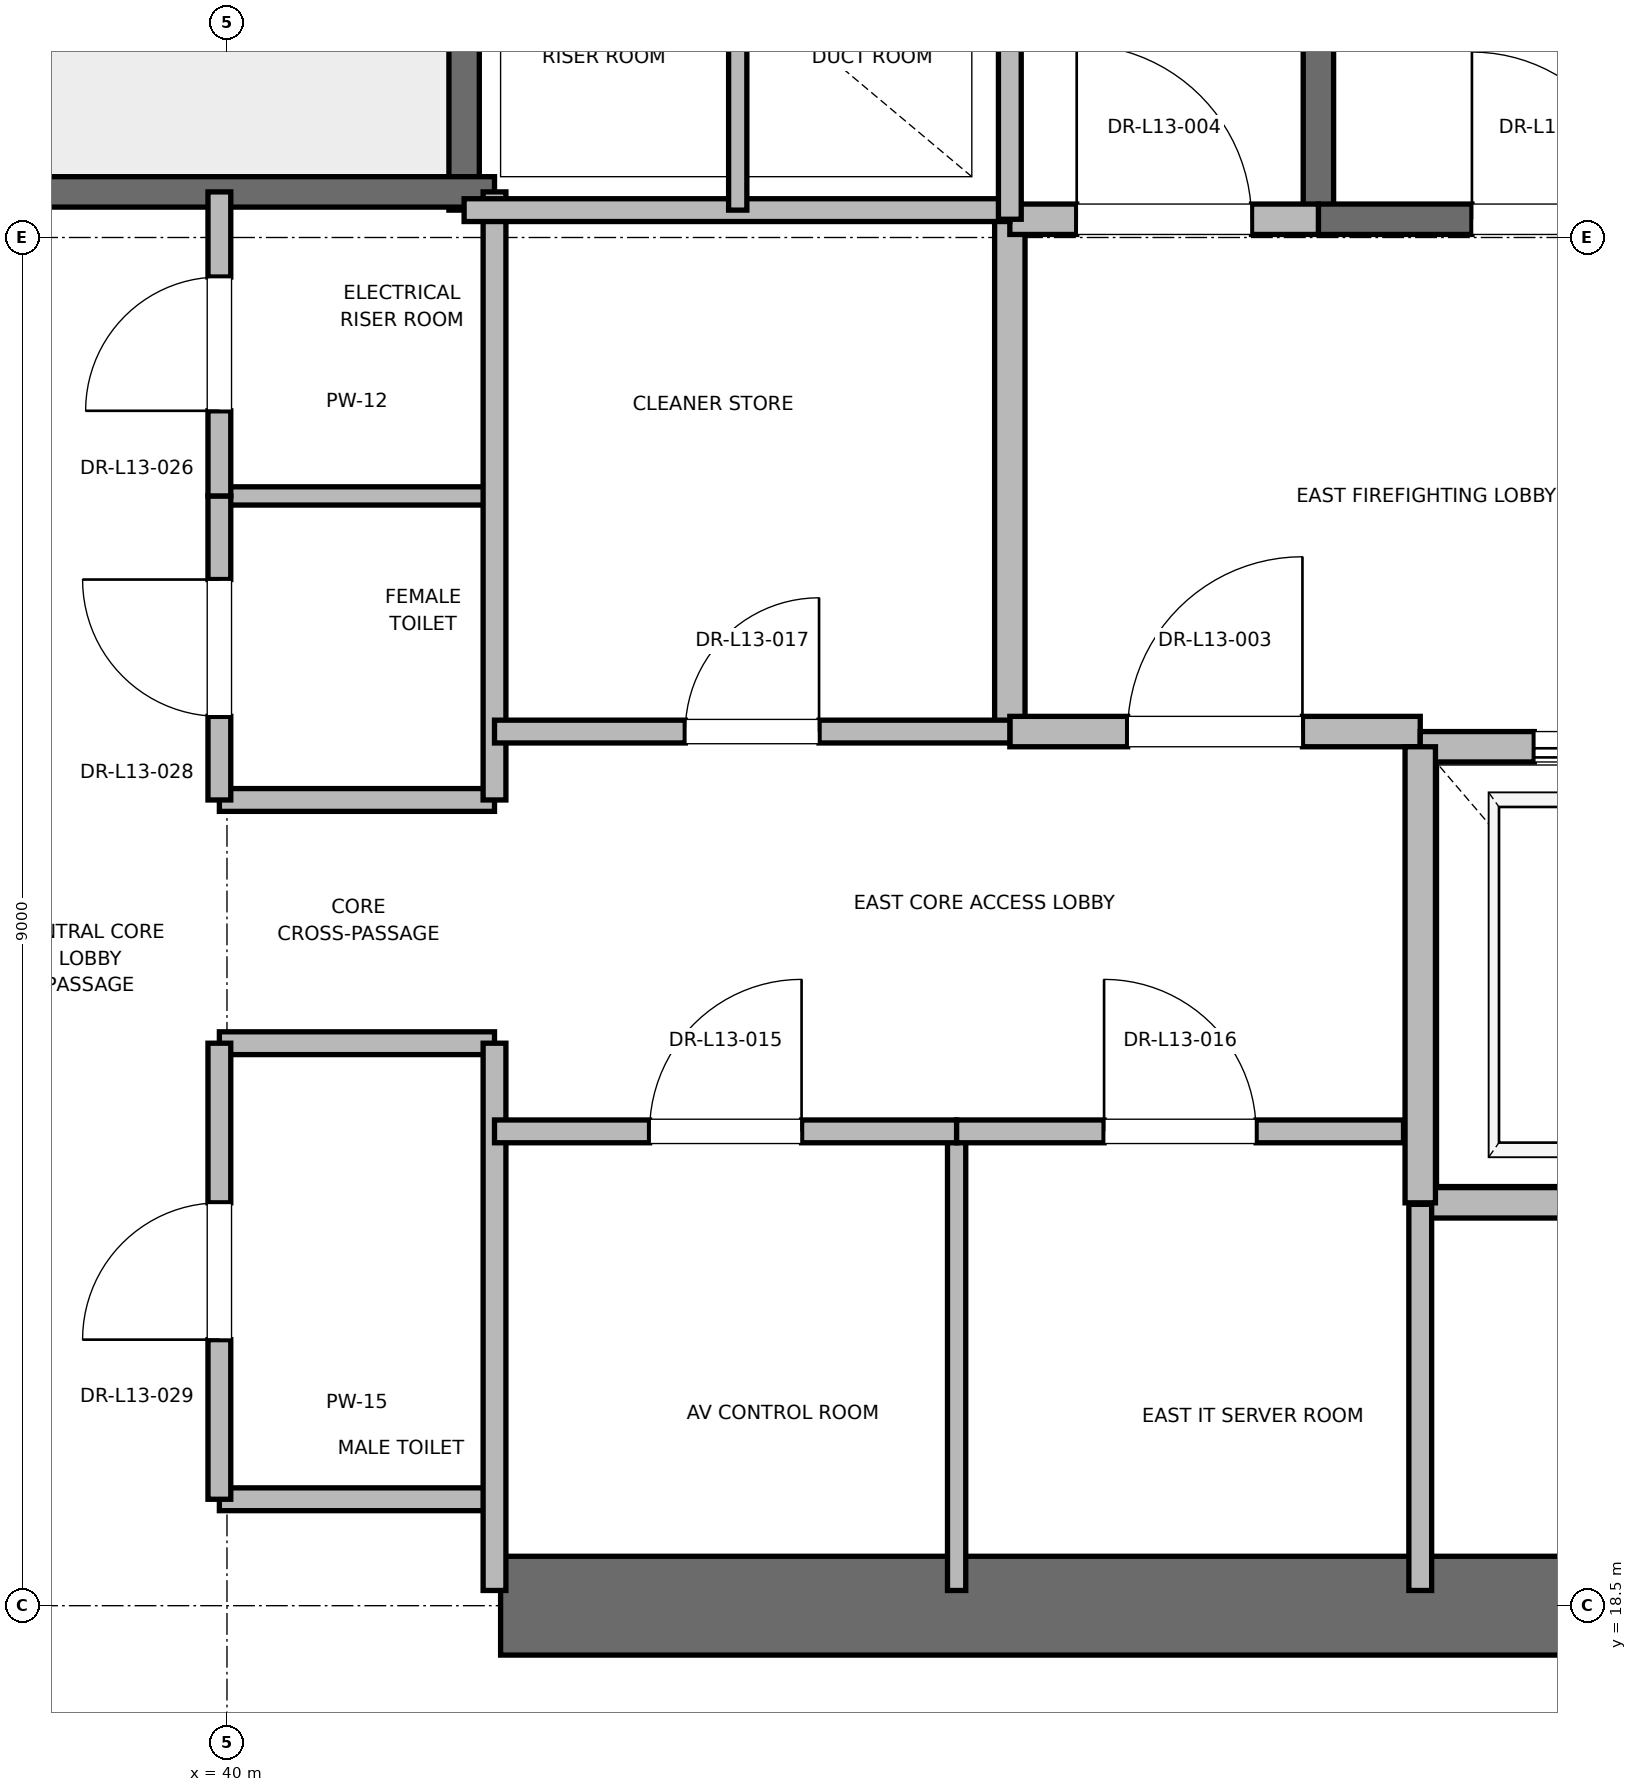
"""IFC4 building model, lengths in metres.
Left out: names, types, materials, properties, quantities, classifications, styles, units other than length and angle.
Written with IfcOpenShell. Run it as: python <this file> out.ifc"""

import sys

from ifc_helpers import new_model, si_unit, direction, frame, frame_2d, origin, place, context, subcontext, project, spatial, rectangle, extrude, element, fill, save


model = new_model("IFC4")
c1 = context("Model", 3, precision=1e-05, world=origin(), true_north=direction((0.0, 1.0)))
c2 = subcontext(c1, "Body", "Model", "MODEL_VIEW")
j1 = project(units=[si_unit("LENGTHUNIT", "METRE"), si_unit("PLANEANGLEUNIT", "RADIAN")], contexts=[c1])
p1 = place(None, origin())
s1 = spatial("IfcSite", under=j1, at=p1, CompositionType="ELEMENT")
p2 = place(p1, origin())
s2 = spatial("IfcBuilding", under=s1, at=p2, CompositionType="ELEMENT")
p3 = place(p2, frame((0.0, 0.0, 59.6)))
s3 = spatial("IfcBuildingStorey", under=s2, at=p3, CompositionType="ELEMENT", Elevation=59.6)
p4 = place(p3, frame((41.8, 18.5, 0.0), z_axis=(0.0, 0.0, 1.0), x_axis=(1.0, 0.0, 0.0)))
e1 = element("IfcWall", 1, at=p4, inside=s3, PredefinedType="SHEAR", context=c2, shape_type="SweptSolid", body=[
    extrude(rectangle(XDim=9.2, YDim=0.65, at=frame_2d((4.6, 0.0))), origin(), (0.0, 0.0, 1.0), 3.76),
])
p5 = place(p3, frame((47.18, 27.62, 0.0), z_axis=(0.0, 0.0, 1.0), x_axis=(0.0, 1.0, 0.0)))
e2 = element("IfcWall", 2, at=p5, inside=s3, PredefinedType="SOLIDWALL", context=c2, shape_type="SweptSolid", body=[
    extrude(rectangle(XDim=8.18, YDim=0.2, at=frame_2d((4.09, 0.0))), origin(), (0.0, 0.0, 1.0), 3.76),
])
p6 = place(p3, frame((47.18, 27.62, 0.0), z_axis=(0.0, 0.0, 1.0), x_axis=(1.0, 0.0, 0.0)))
e3 = element("IfcWall", 3, at=p6, inside=s3, PredefinedType="SOLIDWALL", context=c2, shape_type="SweptSolid", body=[
    extrude(rectangle(XDim=3.12, YDim=0.2, at=frame_2d((1.56, 0.0))), origin(), (0.0, 0.0, 1.0), 3.76),
])
p7 = place(p6, frame((1.01, 0.0, 0.0)))
e4 = element("IfcOpeningElement", 4, at=p7, cuts=e3, PredefinedType="OPENING", context=c2, shape_type="SweptSolid", body=[
    extrude(rectangle(XDim=1.1, YDim=2.15, at=frame_2d((0.55, 1.075))), frame((0.0, 0.1, 0.0), z_axis=(0.0, -1.0, 0.0), x_axis=(1.0, 0.0, 0.0)), (0.0, 0.0, 1.0), 0.2),
])
p8 = place(p3, frame((41.56, 27.68, 0.0), z_axis=(0.0, 0.0, 1.0), x_axis=(0.0, 1.0, 0.0)))
e5 = element("IfcWall", 5, at=p8, inside=s3, PredefinedType="SOLIDWALL", context=c2, shape_type="SweptSolid", body=[
    extrude(rectangle(XDim=8.57, YDim=0.2, at=frame_2d((4.285, 0.0))), origin(), (0.0, 0.0, 1.0), 3.76),
])
p9 = place(p3, frame((38.44, 27.8, 0.0), z_axis=(0.0, 0.0, 1.0), x_axis=(1.0, 0.0, 0.0)))
e6 = element("IfcWall", 6, at=p9, inside=s3, PredefinedType="SOLIDWALL", context=c2, shape_type="SweptSolid", body=[
    extrude(rectangle(XDim=3.32, YDim=0.2, at=frame_2d((1.66, 0.0))), origin(), (0.0, 0.0, 1.0), 3.76),
])
p10 = place(p3, frame((45.15, 24.25, 0.0), z_axis=(0.0, 0.0, 1.0), x_axis=(0.0, 1.0, 0.0)))
e7 = element("IfcWall", 7, at=p10, inside=s3, PredefinedType="PARTITIONING", context=c2, shape_type="SweptSolid", body=[
    extrude(rectangle(XDim=3.37, YDim=0.2, at=frame_2d((1.685, 0.0))), origin(), (0.0, 0.0, 1.0), 3.76),
])
p11 = place(p3, frame((45.15, 24.25, 0.0), z_axis=(0.0, 0.0, 1.0), x_axis=(1.0, 0.0, 0.0)))
e8 = element("IfcWall", 8, at=p11, inside=s3, PredefinedType="PARTITIONING", context=c2, shape_type="SweptSolid", body=[
    extrude(rectangle(XDim=2.7, YDim=0.2, at=frame_2d((1.35, 0.0))), origin(), (0.0, 0.0, 1.0), 3.76),
])
p12 = place(p11, frame((0.775, 0.0, 0.0)))
e9 = element("IfcOpeningElement", 9, at=p12, cuts=e8, PredefinedType="OPENING", context=c2, shape_type="SweptSolid", body=[
    extrude(rectangle(XDim=1.15, YDim=2.2, at=frame_2d((0.575, 1.1))), frame((0.0, 0.1, 0.0), z_axis=(0.0, -1.0, 0.0), x_axis=(1.0, 0.0, 0.0)), (0.0, 0.0, 1.0), 0.2),
])
p13 = place(p3, frame((45.15, 27.62, 0.0), z_axis=(0.0, 0.0, 1.0), x_axis=(1.0, 0.0, 0.0)))
e10 = element("IfcWall", 10, at=p13, inside=s3, PredefinedType="PARTITIONING", context=c2, shape_type="SweptSolid", body=[
    extrude(rectangle(XDim=2.03, YDim=0.2, at=frame_2d((1.015, 0.0))), origin(), (0.0, 0.0, 1.0), 3.76),
])
p14 = place(p13, frame((0.44, 0.0, 0.0)))
e11 = element("IfcOpeningElement", 11, at=p14, cuts=e10, PredefinedType="OPENING", context=c2, shape_type="SweptSolid", body=[
    extrude(rectangle(XDim=1.15, YDim=2.2, at=frame_2d((0.575, 1.1))), frame((0.0, 0.1, 0.0), z_axis=(0.0, -1.0, 0.0), x_axis=(1.0, 0.0, 0.0)), (0.0, 0.0, 1.0), 0.2),
])
p15 = place(p3, frame((47.85, 21.15, 0.0), z_axis=(0.0, 0.0, 1.0), x_axis=(1.0, 0.0, 0.0)))
e12 = element("IfcWall", 12, at=p15, inside=s3, PredefinedType="SOLIDWALL", context=c2, shape_type="SweptSolid", body=[
    extrude(rectangle(XDim=2.6, YDim=0.2, at=frame_2d((1.3, 0.0))), origin(), (0.0, 0.0, 1.0), 3.76),
])
p16 = place(p3, frame((50.45, 24.15, 0.0), z_axis=(0.0, 0.0, 1.0), x_axis=(-1.0, 0.0, 0.0)))
e13 = element("IfcWall", 13, at=p16, inside=s3, PredefinedType="SOLIDWALL", context=c2, shape_type="SweptSolid", body=[
    extrude(rectangle(XDim=2.6, YDim=0.2, at=frame_2d((1.3, 0.0))), origin(), (0.0, 0.0, 1.0), 2.54),
])
p17 = place(p16, frame((0.75, 0.0, 0.0)))
e14 = element("IfcOpeningElement", 14, at=p17, cuts=e13, PredefinedType="OPENING", context=c2, shape_type="SweptSolid", body=[
    extrude(rectangle(XDim=1.1, YDim=2.2, at=frame_2d((0.55, 1.1))), frame((0.0, 0.1, 0.0), z_axis=(0.0, -1.0, 0.0), x_axis=(1.0, 0.0, 0.0)), (0.0, 0.0, 1.0), 0.2),
])
p18 = place(p3, frame((47.85, 24.15, 0.0), z_axis=(0.0, 0.0, 1.0), x_axis=(0.0, -1.0, 0.0)))
e15 = element("IfcWall", 15, at=p18, inside=s3, PredefinedType="SOLIDWALL", context=c2, shape_type="SweptSolid", body=[
    extrude(rectangle(XDim=3.0, YDim=0.2, at=frame_2d((1.5, 0.0))), origin(), (0.0, 0.0, 1.0), 3.76),
])
for number, where, z_axis, x_axis in (
    (16, (39.95, 19.2, 0.0), (0.0, 0.0, 1.0), (1.0, 0.0, 0.0)),
    (17, (39.95, 22.2, 0.0), (0.0, 0.0, 1.0), (1.0, 0.0, 0.0)),
    (18, (39.95, 23.8, 0.0), (0.0, 0.0, 1.0), (1.0, 0.0, 0.0)),
):
    element("IfcWall", number, at=place(p3, frame(where, z_axis=z_axis, x_axis=x_axis)), inside=s3, PredefinedType="PARTITIONING", context=c2, shape_type="SweptSolid", body=[
        extrude(rectangle(XDim=1.81, YDim=0.15, at=frame_2d((0.905, 0.0))), origin(), (0.0, 0.0, 1.0), 2.85),
    ])
p19 = place(p3, frame((39.95, 25.8, 0.0), z_axis=(0.0, 0.0, 1.0), x_axis=(1.0, 0.0, 0.0)))
e19 = element("IfcWall", 19, at=p19, inside=s3, PredefinedType="PARTITIONING", context=c2, shape_type="SweptSolid", body=[
    extrude(rectangle(XDim=1.81, YDim=0.12, at=frame_2d((0.905, 0.0))), origin(), (0.0, 0.0, 1.0), 2.85),
])
p20 = place(p3, frame((41.76, 18.6, 0.0), z_axis=(0.0, 0.0, 1.0), x_axis=(0.0, 1.0, 0.0)))
e20 = element("IfcWall", 20, at=p20, inside=s3, PredefinedType="PARTITIONING", context=c2, shape_type="SweptSolid", body=[
    extrude(rectangle(XDim=3.6, YDim=0.15, at=frame_2d((1.8, 0.0))), origin(), (0.0, 0.0, 1.0), 2.54),
])
p21 = place(p3, frame((41.76, 23.8, 0.0), z_axis=(0.0, 0.0, 1.0), x_axis=(0.0, 1.0, 0.0)))
e21 = element("IfcWall", 21, at=p21, inside=s3, PredefinedType="PARTITIONING", context=c2, shape_type="SweptSolid", body=[
    extrude(rectangle(XDim=4.0, YDim=0.15, at=frame_2d((2.0, 0.0))), origin(), (0.0, 0.0, 1.0), 2.85),
])
p22 = place(p3, frame((39.95, 19.2, 0.0), z_axis=(0.0, 0.0, 1.0), x_axis=(0.0, 1.0, 0.0)))
e22 = element("IfcWall", 22, at=p22, inside=s3, PredefinedType="PARTITIONING", context=c2, shape_type="SweptSolid", body=[
    extrude(rectangle(XDim=3.0, YDim=0.15, at=frame_2d((1.5, 0.0))), origin(), (0.0, 0.0, 1.0), 2.85),
])
p23 = place(p22, frame((1.05, 0.0, 0.0)))
e23 = element("IfcOpeningElement", 23, at=p23, cuts=e22, PredefinedType="OPENING", context=c2, shape_type="SweptSolid", body=[
    extrude(rectangle(XDim=0.9, YDim=2.1, at=frame_2d((0.45, 1.05))), frame((0.0, 0.075, 0.0), z_axis=(0.0, -1.0, 0.0), x_axis=(1.0, 0.0, 0.0)), (0.0, 0.0, 1.0), 0.15),
])
p24 = place(p3, frame((39.95, 23.8, 0.0), z_axis=(0.0, 0.0, 1.0), x_axis=(0.0, 1.0, 0.0)))
e24 = element("IfcWall", 24, at=p24, inside=s3, PredefinedType="PARTITIONING", context=c2, shape_type="SweptSolid", body=[
    extrude(rectangle(XDim=2.0, YDim=0.15, at=frame_2d((1.0, 0.0))), origin(), (0.0, 0.0, 1.0), 2.85),
])
p25 = place(p24, frame((0.55, 0.0, 0.0)))
e25 = element("IfcOpeningElement", 25, at=p25, cuts=e24, PredefinedType="OPENING", context=c2, shape_type="SweptSolid", body=[
    extrude(rectangle(XDim=0.9, YDim=2.1, at=frame_2d((0.45, 1.05))), frame((0.0, 0.075, 0.0), z_axis=(0.0, -1.0, 0.0), x_axis=(1.0, 0.0, 0.0)), (0.0, 0.0, 1.0), 0.15),
])
p26 = place(p3, frame((39.95, 25.8, 0.0), z_axis=(0.0, 0.0, 1.0), x_axis=(0.0, 1.0, 0.0)))
e26 = element("IfcWall", 26, at=p26, inside=s3, PredefinedType="PARTITIONING", context=c2, shape_type="SweptSolid", body=[
    extrude(rectangle(XDim=2.0, YDim=0.15, at=frame_2d((1.0, 0.0))), origin(), (0.0, 0.0, 1.0), 2.85),
])
p27 = place(p26, frame((0.56, 0.0, 0.0)))
e27 = element("IfcOpeningElement", 27, at=p27, cuts=e26, PredefinedType="OPENING", context=c2, shape_type="SweptSolid", body=[
    extrude(rectangle(XDim=0.88, YDim=2.1, at=frame_2d((0.44, 1.05))), frame((0.0, 0.075, 0.0), z_axis=(0.0, -1.0, 0.0), x_axis=(1.0, 0.0, 0.0)), (0.0, 0.0, 1.0), 0.15),
])
p28 = place(p3, frame((41.56, 27.68, 0.0), z_axis=(0.0, 0.0, 1.0), x_axis=(1.0, 0.0, 0.0)))
e28 = element("IfcWall", 28, at=p28, inside=s3, PredefinedType="PARTITIONING", context=c2, shape_type="SweptSolid", body=[
    extrude(rectangle(XDim=3.59, YDim=0.15, at=frame_2d((1.795, 0.0))), origin(), (0.0, 0.0, 1.0), 2.85),
])
p29 = place(p3, frame((47.85, 18.6, 0.0), z_axis=(0.0, 0.0, 1.0), x_axis=(0.0, 1.0, 0.0)))
e29 = element("IfcWall", 29, at=p29, inside=s3, PredefinedType="PARTITIONING", context=c2, shape_type="SweptSolid", body=[
    extrude(rectangle(XDim=2.54, YDim=0.15, at=frame_2d((1.27, 0.0))), origin(), (0.0, 0.0, 1.0), 2.85),
])
p30 = place(p3, frame((44.8, 18.6, 0.0), z_axis=(0.0, 0.0, 1.0), x_axis=(0.0, 1.0, 0.0)))
e30 = element("IfcWall", 30, at=p30, inside=s3, PredefinedType="PARTITIONING", context=c2, shape_type="SweptSolid", body=[
    extrude(rectangle(XDim=3.02, YDim=0.12, at=frame_2d((1.51, 0.0))), origin(), (0.0, 0.0, 1.0), 2.85),
])
p31 = place(p3, frame((41.76, 21.62, 0.0), z_axis=(0.0, 0.0, 1.0), x_axis=(1.0, 0.0, 0.0)))
e31 = element("IfcWall", 31, at=p31, inside=s3, PredefinedType="PARTITIONING", context=c2, shape_type="SweptSolid", body=[
    extrude(rectangle(XDim=3.04, YDim=0.15, at=frame_2d((1.52, 0.0))), origin(), (0.0, 0.0, 1.0), 2.85),
])
p32 = place(p31, frame((1.02, 0.0, 0.0)))
e32 = element("IfcOpeningElement", 32, at=p32, cuts=e31, PredefinedType="OPENING", context=c2, shape_type="SweptSolid", body=[
    extrude(rectangle(XDim=1.0, YDim=2.15, at=frame_2d((0.5, 1.075))), frame((0.0, 0.075, 0.0), z_axis=(0.0, -1.0, 0.0), x_axis=(1.0, 0.0, 0.0)), (0.0, 0.0, 1.0), 0.15),
])
p33 = place(p3, frame((44.8, 21.62, 0.0), z_axis=(0.0, 0.0, 1.0), x_axis=(1.0, 0.0, 0.0)))
e33 = element("IfcWall", 33, at=p33, inside=s3, PredefinedType="PARTITIONING", context=c2, shape_type="SweptSolid", body=[
    extrude(rectangle(XDim=2.94, YDim=0.15, at=frame_2d((1.47, 0.0))), origin(), (0.0, 0.0, 1.0), 2.85),
])
p34 = place(p33, frame((0.97, 0.0, 0.0)))
e34 = element("IfcOpeningElement", 34, at=p34, cuts=e33, PredefinedType="OPENING", context=c2, shape_type="SweptSolid", body=[
    extrude(rectangle(XDim=1.0, YDim=2.15, at=frame_2d((0.5, 1.075))), frame((0.0, 0.075, 0.0), z_axis=(0.0, -1.0, 0.0), x_axis=(1.0, 0.0, 0.0)), (0.0, 0.0, 1.0), 0.15),
])
p35 = place(p3, frame((41.76, 24.25, 0.0), z_axis=(0.0, 0.0, 1.0), x_axis=(1.0, 0.0, 0.0)))
e35 = element("IfcWall", 35, at=p35, inside=s3, PredefinedType="PARTITIONING", context=c2, shape_type="SweptSolid", body=[
    extrude(rectangle(XDim=3.39, YDim=0.15, at=frame_2d((1.695, 0.0))), origin(), (0.0, 0.0, 1.0), 2.85),
])
p36 = place(p35, frame((1.255, 0.0, 0.0)))
e36 = element("IfcOpeningElement", 36, at=p36, cuts=e35, PredefinedType="OPENING", context=c2, shape_type="SweptSolid", body=[
    extrude(rectangle(XDim=0.88, YDim=2.1, at=frame_2d((0.44, 1.05))), frame((0.0, 0.075, 0.0), z_axis=(0.0, -1.0, 0.0), x_axis=(1.0, 0.0, 0.0)), (0.0, 0.0, 1.0), 0.15),
])
p37 = place(p3, frame((45.15, 27.62, 0.0), z_axis=(0.0, 0.0, 1.0), x_axis=(0.0, 1.0, 0.0)))
e37 = element("IfcWall", 37, at=p37, inside=s3, PredefinedType="PARTITIONING", context=c2, shape_type="SweptSolid", body=[
    extrude(rectangle(XDim=3.1, YDim=0.15, at=frame_2d((1.55, 0.0))), origin(), (0.0, 0.0, 1.0), 2.85),
])
p38 = place(p3, frame((43.36, 27.68, 0.0), z_axis=(0.0, 0.0, 1.0), x_axis=(0.0, 1.0, 0.0)))
e38 = element("IfcWall", 38, at=p38, inside=s3, PredefinedType="PARTITIONING", context=c2, shape_type="SweptSolid", body=[
    extrude(rectangle(XDim=3.04, YDim=0.12, at=frame_2d((1.52, 0.0))), origin(), (0.0, 0.0, 1.0), 2.85),
])
p39 = place(p7, origin())
e39 = element("IfcDoor", 39, at=p39, inside=s3, OperationType="SINGLE_SWING_LEFT", PredefinedType="DOOR", context=c2, shape_type="SweptSolid", body=[
    extrude(rectangle(XDim=1.1, YDim=2.15, at=frame_2d((0.55, 1.075))), frame((0.0, 0.025, 0.0), z_axis=(0.0, -1.0, 0.0), x_axis=(1.0, 0.0, 0.0)), (0.0, 0.0, 1.0), 0.05),
])
fill(e4, e39)
p40 = place(p12, origin())
e40 = element("IfcDoor", 40, at=p40, inside=s3, OperationType="SINGLE_SWING_RIGHT", PredefinedType="DOOR", context=c2, shape_type="SweptSolid", body=[
    extrude(rectangle(XDim=1.15, YDim=2.2, at=frame_2d((0.575, 1.1))), frame((0.0, 0.025, 0.0), z_axis=(0.0, -1.0, 0.0), x_axis=(1.0, 0.0, 0.0)), (0.0, 0.0, 1.0), 0.05),
])
fill(e9, e40)
p41 = place(p14, origin())
e41 = element("IfcDoor", 41, at=p41, inside=s3, OperationType="SINGLE_SWING_LEFT", PredefinedType="DOOR", context=c2, shape_type="SweptSolid", body=[
    extrude(rectangle(XDim=1.15, YDim=2.2, at=frame_2d((0.575, 1.1))), frame((0.0, 0.025, 0.0), z_axis=(0.0, -1.0, 0.0), x_axis=(1.0, 0.0, 0.0)), (0.0, 0.0, 1.0), 0.05),
])
fill(e11, e41)
p42 = place(p17, origin())
e42 = element("IfcDoor", 42, at=p42, inside=s3, OperationType="SLIDING_TO_RIGHT", PredefinedType="DOOR", context=c2, shape_type="SweptSolid", body=[
    extrude(rectangle(XDim=1.1, YDim=2.2, at=frame_2d((0.55, 1.1))), frame((0.0, 0.025, 0.0), z_axis=(0.0, -1.0, 0.0), x_axis=(1.0, 0.0, 0.0)), (0.0, 0.0, 1.0), 0.05),
])
fill(e14, e42)
p43 = place(p23, origin())
e43 = element("IfcDoor", 43, at=p43, inside=s3, OperationType="SINGLE_SWING_LEFT", PredefinedType="DOOR", context=c2, shape_type="SweptSolid", body=[
    extrude(rectangle(XDim=0.9, YDim=2.1, at=frame_2d((0.45, 1.05))), frame((0.0, 0.025, 0.0), z_axis=(0.0, -1.0, 0.0), x_axis=(1.0, 0.0, 0.0)), (0.0, 0.0, 1.0), 0.05),
])
fill(e23, e43)
p44 = place(p25, origin())
e44 = element("IfcDoor", 44, at=p44, inside=s3, OperationType="SINGLE_SWING_RIGHT", PredefinedType="DOOR", context=c2, shape_type="SweptSolid", body=[
    extrude(rectangle(XDim=0.9, YDim=2.1, at=frame_2d((0.45, 1.05))), frame((0.0, 0.025, 0.0), z_axis=(0.0, -1.0, 0.0), x_axis=(1.0, 0.0, 0.0)), (0.0, 0.0, 1.0), 0.05),
])
fill(e25, e44)
p45 = place(p27, origin())
e45 = element("IfcDoor", 45, at=p45, inside=s3, OperationType="SINGLE_SWING_LEFT", PredefinedType="DOOR", context=c2, shape_type="SweptSolid", body=[
    extrude(rectangle(XDim=0.88, YDim=2.1, at=frame_2d((0.44, 1.05))), frame((0.0, 0.025, 0.0), z_axis=(0.0, -1.0, 0.0), x_axis=(1.0, 0.0, 0.0)), (0.0, 0.0, 1.0), 0.05),
])
fill(e27, e45)
p46 = place(p32, origin())
e46 = element("IfcDoor", 46, at=p46, inside=s3, OperationType="SINGLE_SWING_RIGHT", PredefinedType="DOOR", context=c2, shape_type="SweptSolid", body=[
    extrude(rectangle(XDim=1.0, YDim=2.15, at=frame_2d((0.5, 1.075))), frame((0.0, 0.025, 0.0), z_axis=(0.0, -1.0, 0.0), x_axis=(1.0, 0.0, 0.0)), (0.0, 0.0, 1.0), 0.05),
])
fill(e32, e46)
p47 = place(p34, origin())
e47 = element("IfcDoor", 47, at=p47, inside=s3, OperationType="SINGLE_SWING_LEFT", PredefinedType="DOOR", context=c2, shape_type="SweptSolid", body=[
    extrude(rectangle(XDim=1.0, YDim=2.15, at=frame_2d((0.5, 1.075))), frame((0.0, 0.025, 0.0), z_axis=(0.0, -1.0, 0.0), x_axis=(1.0, 0.0, 0.0)), (0.0, 0.0, 1.0), 0.05),
])
fill(e34, e47)
p48 = place(p36, origin())
e48 = element("IfcDoor", 48, at=p48, inside=s3, OperationType="SINGLE_SWING_RIGHT", PredefinedType="DOOR", context=c2, shape_type="SweptSolid", body=[
    extrude(rectangle(XDim=0.88, YDim=2.1, at=frame_2d((0.44, 1.05))), frame((0.0, 0.025, 0.0), z_axis=(0.0, -1.0, 0.0), x_axis=(1.0, 0.0, 0.0)), (0.0, 0.0, 1.0), 0.05),
])
fill(e36, e48)
save(model, sys.argv[1])
